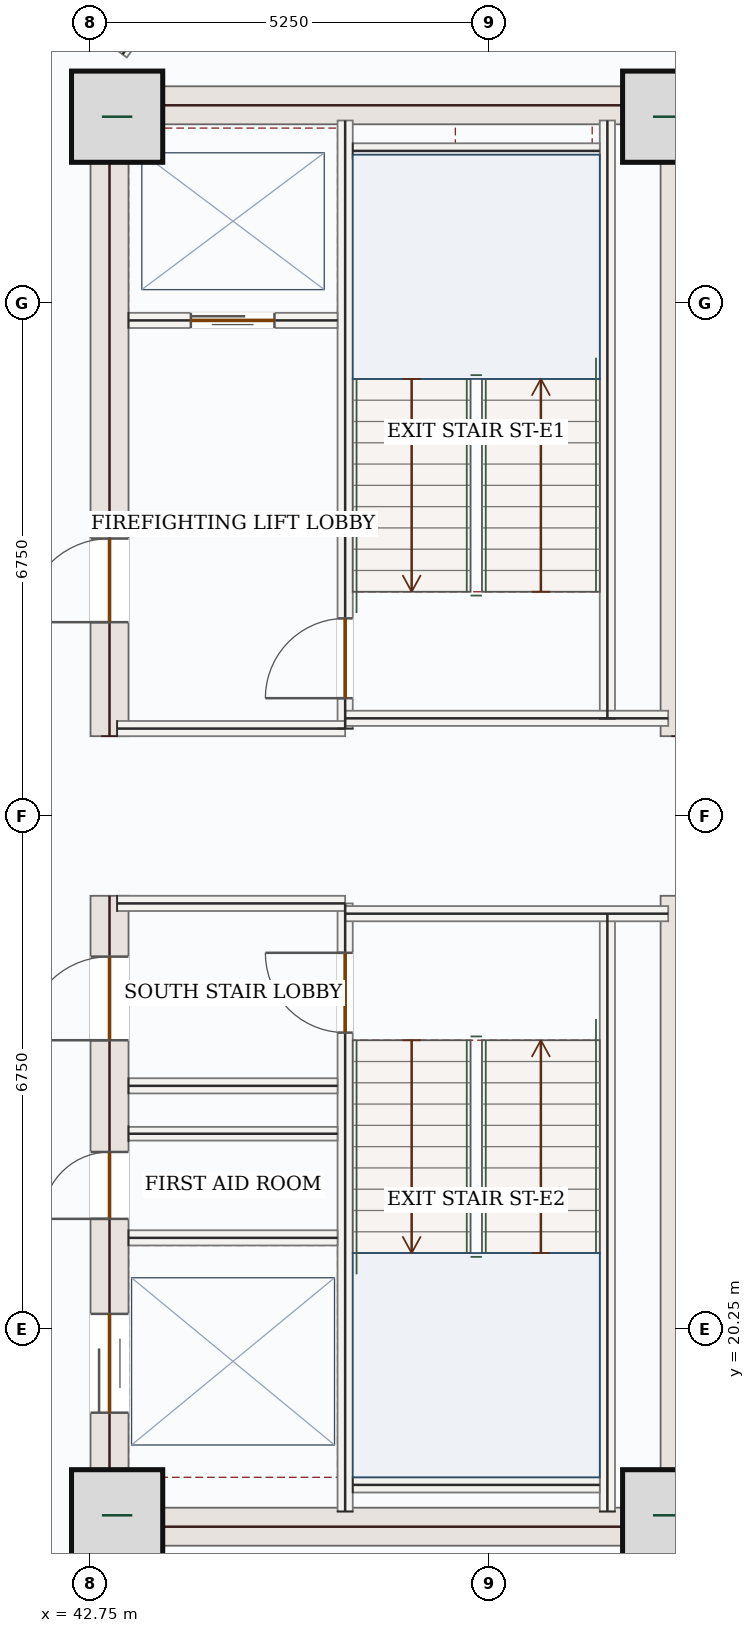
"""IFC4 building model, lengths in metres.
Left out: names, types, materials, properties, quantities, classifications, styles, units other than length and angle.
Written with IfcOpenShell. Run it as: python <this file> out.ifc"""

import sys

from ifc_helpers import new_model, si_unit, direction, frame, frame_2d, origin, origin_2d, place, context, subcontext, project, spatial, rectangle, extrude, source, transform, mapped, element, fill, save


model = new_model("IFC4")
c1 = context("Model", 3, precision=1e-05, world=origin(), true_north=direction((0.0, 1.0)))
c2 = subcontext(c1, "Body", "Model", "MODEL_VIEW")
j1 = project(units=[si_unit("LENGTHUNIT", "METRE"), si_unit("PLANEANGLEUNIT", "RADIAN")], contexts=[c1])
p1 = place(None, origin())
s1 = spatial("IfcSite", under=j1, at=p1, CompositionType="ELEMENT")
p2 = place(p1, origin())
s2 = spatial("IfcBuilding", under=s1, at=p2, CompositionType="ELEMENT")
p3 = place(p2, frame((0.0, 0.0, 135.6)))
s3 = spatial("IfcBuildingStorey", under=s2, at=p3, CompositionType="ELEMENT", Elevation=135.6)
p4 = place(p3, frame((43.0, 17.4, 0.0), z_axis=(0.0, 0.0, 1.0), x_axis=(0.0, 1.0, 0.0)))
e1 = element("IfcWall", 1, at=p4, inside=s3, PredefinedType="SHEAR", context=c2, shape_type="SweptSolid", body=[
    extrude(rectangle(XDim=8.55, YDim=0.5, at=frame_2d((4.275, 0.0))), origin(), (0.0, 0.0, 1.0), 3.62),
])
p5 = place(p4, frame((6.65, 0.0, 0.0)))
e2 = element("IfcOpeningElement", 2, at=p5, cuts=e1, PredefinedType="OPENING", context=c2, shape_type="SweptSolid", body=[
    extrude(rectangle(XDim=1.1, YDim=2.2, at=frame_2d((0.55, 1.1))), frame((0.0, 0.26, 0.0), z_axis=(0.0, -1.0, 0.0), x_axis=(1.0, 0.0, 0.0)), (0.0, 0.0, 1.0), 0.52),
])
p6 = place(p4, frame((1.75, 0.0, 0.0)))
e3 = element("IfcOpeningElement", 3, at=p6, cuts=e1, PredefinedType="OPENING", context=c2, shape_type="SweptSolid", body=[
    extrude(rectangle(XDim=1.3, YDim=2.2, at=frame_2d((0.65, 1.1))), frame((0.0, 0.26, 0.0), z_axis=(0.0, -1.0, 0.0), x_axis=(1.0, 0.0, 0.0)), (0.0, 0.0, 1.0), 0.52),
])
p7 = place(p4, frame((4.3, 0.0, 0.0)))
e4 = element("IfcOpeningElement", 4, at=p7, cuts=e1, PredefinedType="OPENING", context=c2, shape_type="SweptSolid", body=[
    extrude(rectangle(XDim=0.88, YDim=2.1, at=frame_2d((0.44, 1.05))), frame((0.0, 0.26, 0.0), z_axis=(0.0, -1.0, 0.0), x_axis=(1.0, 0.0, 0.0)), (0.0, 0.0, 1.0), 0.52),
])
p8 = place(p3, frame((43.0, 28.05, 0.0), z_axis=(0.0, 0.0, 1.0), x_axis=(0.0, 1.0, 0.0)))
e5 = element("IfcWall", 5, at=p8, inside=s3, PredefinedType="SHEAR", context=c2, shape_type="SweptSolid", body=[
    extrude(rectangle(XDim=8.55, YDim=0.5, at=frame_2d((4.275, 0.0))), origin(), (0.0, 0.0, 1.0), 3.62),
])
p9 = place(p8, frame((1.5, 0.0, 0.0)))
e6 = element("IfcOpeningElement", 6, at=p9, cuts=e5, PredefinedType="OPENING", context=c2, shape_type="SweptSolid", body=[
    extrude(rectangle(XDim=1.1, YDim=2.2, at=frame_2d((0.55, 1.1))), frame((0.0, 0.26, 0.0), z_axis=(0.0, -1.0, 0.0), x_axis=(1.0, 0.0, 0.0)), (0.0, 0.0, 1.0), 0.52),
])
m1 = source(origin(), c2, "Body", "SweptSolid", [
    extrude(rectangle(XDim=8.55, YDim=0.5, at=frame_2d((4.275, 0.0))), origin(), (0.0, 0.0, 1.0), 3.62),
])
for number, where, z_axis, x_axis in (
    (7, (50.5, 17.4, 0.0), (0.0, 0.0, 1.0), (0.0, 1.0, 0.0)),
    (8, (50.5, 28.05, 0.0), (0.0, 0.0, 1.0), (0.0, 1.0, 0.0)),
):
    element("IfcWall", number, at=place(p3, frame(where, z_axis=z_axis, x_axis=x_axis)), inside=s3, PredefinedType="SHEAR", context=c2, shape_type="MappedRepresentation", body=[
        mapped(m1, transform((0.0, 0.0, 0.0), x_axis=(1.0, 0.0, 0.0), y_axis=(0.0, 1.0, 0.0), z_axis=(0.0, 0.0, 1.0), scale=1.0)),
    ])
m2 = source(origin(), c2, "Body", "SweptSolid", [
    extrude(rectangle(XDim=7.0, YDim=0.5, at=frame_2d((3.5, 0.0))), origin(), (0.0, 0.0, 1.0), 3.62),
])
for number, where, z_axis, x_axis in (
    (9, (43.25, 17.65, 0.0), (0.0, 0.0, 1.0), (1.0, 0.0, 0.0)),
    (10, (43.25, 36.35, 0.0), (0.0, 0.0, 1.0), (1.0, 0.0, 0.0)),
):
    element("IfcWall", number, at=place(p3, frame(where, z_axis=z_axis, x_axis=x_axis)), inside=s3, PredefinedType="SHEAR", context=c2, shape_type="MappedRepresentation", body=[
        mapped(m2, transform((0.0, 0.0, 0.0), x_axis=(1.0, 0.0, 0.0), y_axis=(0.0, 1.0, 0.0), z_axis=(0.0, 0.0, 1.0), scale=1.0)),
    ])
m3 = source(origin(), c2, "Body", "SweptSolid", [
    extrude(rectangle(XDim=1.2, YDim=1.2, at=origin_2d()), origin(), (0.0, 0.0, 1.0), 3.9),
])
for number, where, z_axis, x_axis in (
    (11, (43.1, 17.8, 0.0), (0.0, 0.0, 1.0), (1.0, 0.0, 0.0)),
    (12, (50.35, 17.8, 0.0), (0.0, 0.0, 1.0), (1.0, 0.0, 0.0)),
    (13, (43.1, 36.2, 0.0), (0.0, 0.0, 1.0), (1.0, 0.0, 0.0)),
    (14, (50.35, 36.2, 0.0), (0.0, 0.0, 1.0), (1.0, 0.0, 0.0)),
):
    element("IfcColumn", number, at=place(p3, frame(where, z_axis=z_axis, x_axis=x_axis)), inside=s3, PredefinedType="COLUMN", context=c2, shape_type="MappedRepresentation", body=[
        mapped(m3, transform((0.0, 0.0, 0.0), x_axis=(1.0, 0.0, 0.0), y_axis=(0.0, 1.0, 0.0), z_axis=(0.0, 0.0, 1.0), scale=1.0)),
    ])
m4 = source(origin(), c2, "Body", "SweptSolid", [
    extrude(rectangle(XDim=5.258, YDim=0.28, at=frame_2d((2.629, 0.0))), origin(), (0.0, 0.0, 1.0), 3.62),
])
p10 = place(p3, frame((53.06, 18.458, 0.0), z_axis=(0.0, 0.0, 1.0), x_axis=(-0.707106781187, -0.707106781187, 0.0)))
e15 = element("IfcWall", 15, at=p10, inside=s3, PredefinedType="SOLIDWALL", context=c2, shape_type="MappedRepresentation", body=[
    mapped(m4, transform((0.0, 0.0, 0.0), x_axis=(1.0, 0.0, 0.0), y_axis=(0.0, 1.0, 0.0), z_axis=(0.0, 0.0, 1.0), scale=1.0)),
])
m5 = source(origin(), c2, "Body", "SweptSolid", [
    extrude(rectangle(XDim=3.967, YDim=0.28, at=frame_2d((1.984, 0.0))), origin(), (0.0, 0.0, 1.0), 3.62),
])
p11 = place(p3, frame((49.342, 39.26, 0.0), z_axis=(0.0, 0.0, 1.0), x_axis=(0.707076011326, -0.707137549708, 0.0)))
e16 = element("IfcWall", 16, at=p11, inside=s3, PredefinedType="SOLIDWALL", context=c2, shape_type="MappedRepresentation", body=[
    mapped(m5, transform((0.0, 0.0, 0.0), x_axis=(1.0, 0.0, 0.0), y_axis=(0.0, 1.0, 0.0), z_axis=(0.0, 0.0, 1.0), scale=1.0)),
])
m6 = source(origin(), c2, "Body", "SweptSolid", [
    extrude(rectangle(XDim=7.87, YDim=0.2, at=frame_2d((3.935, 0.0))), origin(), (0.0, 0.0, 1.0), 3.62),
])
for number, where, z_axis, x_axis in (
    (17, (49.55, 17.85, 0.0), (0.0, 0.0, 1.0), (0.0, 1.0, 0.0)),
    (18, (49.55, 28.28, 0.0), (0.0, 0.0, 1.0), (0.0, 1.0, 0.0)),
):
    element("IfcWall", number, at=place(p3, frame(where, z_axis=z_axis, x_axis=x_axis)), inside=s3, PredefinedType="SOLIDWALL", context=c2, shape_type="MappedRepresentation", body=[
        mapped(m6, transform((0.0, 0.0, 0.0), x_axis=(1.0, 0.0, 0.0), y_axis=(0.0, 1.0, 0.0), z_axis=(0.0, 0.0, 1.0), scale=1.0)),
    ])
p12 = place(p3, frame((46.1, 17.85, 0.0), z_axis=(0.0, 0.0, 1.0), x_axis=(0.0, 1.0, 0.0)))
e19 = element("IfcWall", 19, at=p12, inside=s3, PredefinedType="SOLIDWALL", context=c2, shape_type="SweptSolid", body=[
    extrude(rectangle(XDim=8.0, YDim=0.2, at=frame_2d((4.0, 0.0))), origin(), (0.0, 0.0, 1.0), 3.62),
])
p13 = place(p12, frame((6.3, 0.0, 0.0)))
e20 = element("IfcOpeningElement", 20, at=p13, cuts=e19, PredefinedType="OPENING", context=c2, shape_type="SweptSolid", body=[
    extrude(rectangle(XDim=1.05, YDim=2.15, at=frame_2d((0.525, 1.075))), frame((0.0, 0.11, 0.0), z_axis=(0.0, -1.0, 0.0), x_axis=(1.0, 0.0, 0.0)), (0.0, 0.0, 1.0), 0.22),
])
p14 = place(p3, frame((46.1, 28.15, 0.0), z_axis=(0.0, 0.0, 1.0), x_axis=(0.0, 1.0, 0.0)))
e21 = element("IfcWall", 21, at=p14, inside=s3, PredefinedType="SOLIDWALL", context=c2, shape_type="SweptSolid", body=[
    extrude(rectangle(XDim=8.0, YDim=0.2, at=frame_2d((4.0, 0.0))), origin(), (0.0, 0.0, 1.0), 3.62),
])
p15 = place(p14, frame((0.4, 0.0, 0.0)))
e22 = element("IfcOpeningElement", 22, at=p15, cuts=e21, PredefinedType="OPENING", context=c2, shape_type="SweptSolid", body=[
    extrude(rectangle(XDim=1.05, YDim=2.15, at=frame_2d((0.525, 1.075))), frame((0.0, 0.11, 0.0), z_axis=(0.0, -1.0, 0.0), x_axis=(1.0, 0.0, 0.0)), (0.0, 0.0, 1.0), 0.22),
])
m7 = source(origin(), c2, "Body", "SweptSolid", [
    extrude(rectangle(XDim=3.0, YDim=0.2, at=frame_2d((1.5, 0.0))), origin(), (0.0, 0.0, 1.0), 3.62),
])
p16 = place(p3, frame((43.1, 25.85, 0.0), z_axis=(0.0, 0.0, 1.0), x_axis=(1.0, 0.0, 0.0)))
e23 = element("IfcWall", 23, at=p16, inside=s3, PredefinedType="SOLIDWALL", context=c2, shape_type="MappedRepresentation", body=[
    mapped(m7, transform((0.0, 0.0, 0.0), x_axis=(1.0, 0.0, 0.0), y_axis=(0.0, 1.0, 0.0), z_axis=(0.0, 0.0, 1.0), scale=1.0)),
])
m8 = source(origin(), c2, "Body", "SweptSolid", [
    extrude(rectangle(XDim=4.25, YDim=0.2, at=frame_2d((2.125, 0.0))), origin(), (0.0, 0.0, 1.0), 3.62),
])
p17 = place(p3, frame((46.1, 25.715, 0.0), z_axis=(0.0, 0.0, 1.0), x_axis=(1.0, 0.0, 0.0)))
e24 = element("IfcWall", 24, at=p17, inside=s3, PredefinedType="SOLIDWALL", context=c2, shape_type="MappedRepresentation", body=[
    mapped(m8, transform((0.0, 0.0, 0.0), x_axis=(1.0, 0.0, 0.0), y_axis=(0.0, 1.0, 0.0), z_axis=(0.0, 0.0, 1.0), scale=1.0)),
])
p18 = place(p3, frame((43.1, 28.15, 0.0), z_axis=(0.0, 0.0, 1.0), x_axis=(1.0, 0.0, 0.0)))
e25 = element("IfcWall", 25, at=p18, inside=s3, PredefinedType="SOLIDWALL", context=c2, shape_type="MappedRepresentation", body=[
    mapped(m7, transform((0.0, 0.0, 0.0), x_axis=(1.0, 0.0, 0.0), y_axis=(0.0, 1.0, 0.0), z_axis=(0.0, 0.0, 1.0), scale=1.0)),
])
p19 = place(p3, frame((46.1, 28.285, 0.0), z_axis=(0.0, 0.0, 1.0), x_axis=(1.0, 0.0, 0.0)))
e26 = element("IfcWall", 26, at=p19, inside=s3, PredefinedType="SOLIDWALL", context=c2, shape_type="MappedRepresentation", body=[
    mapped(m8, transform((0.0, 0.0, 0.0), x_axis=(1.0, 0.0, 0.0), y_axis=(0.0, 1.0, 0.0), z_axis=(0.0, 0.0, 1.0), scale=1.0)),
])
m9 = source(origin(), c2, "Body", "SweptSolid", [
    extrude(rectangle(XDim=3.25, YDim=0.2, at=frame_2d((1.625, 0.0))), origin(), (0.0, 0.0, 1.0), 3.62),
])
for number, where, z_axis, x_axis in (
    (27, (46.2, 35.75, 0.0), (0.0, 0.0, 1.0), (1.0, 0.0, 0.0)),
    (28, (46.2, 18.2, 0.0), (0.0, 0.0, 1.0), (1.0, 0.0, 0.0)),
):
    element("IfcWall", number, at=place(p3, frame(where, z_axis=z_axis, x_axis=x_axis)), inside=s3, PredefinedType="SOLIDWALL", context=c2, shape_type="MappedRepresentation", body=[
        mapped(m9, transform((0.0, 0.0, 0.0), x_axis=(1.0, 0.0, 0.0), y_axis=(0.0, 1.0, 0.0), z_axis=(0.0, 0.0, 1.0), scale=1.0)),
    ])
p20 = place(p3, frame((43.25, 33.52, 0.0), z_axis=(0.0, 0.0, 1.0), x_axis=(1.0, 0.0, 0.0)))
e29 = element("IfcWall", 29, at=p20, inside=s3, PredefinedType="SOLIDWALL", context=c2, shape_type="SweptSolid", body=[
    extrude(rectangle(XDim=2.75, YDim=0.2, at=frame_2d((1.375, 0.0))), origin(), (0.0, 0.0, 1.0), 3.62),
])
p21 = place(p20, frame((0.82, 0.0, 0.0)))
e30 = element("IfcOpeningElement", 30, at=p21, cuts=e29, PredefinedType="OPENING", context=c2, shape_type="SweptSolid", body=[
    extrude(rectangle(XDim=1.1, YDim=2.15, at=frame_2d((0.55, 1.075))), frame((0.0, 0.11, 0.0), z_axis=(0.0, -1.0, 0.0), x_axis=(1.0, 0.0, 0.0)), (0.0, 0.0, 1.0), 0.22),
])
m10 = source(origin(), c2, "Body", "SweptSolid", [
    extrude(rectangle(XDim=2.75, YDim=0.2, at=frame_2d((1.375, 0.0))), origin(), (0.0, 0.0, 1.0), 3.62),
])
for number, where, z_axis, x_axis in (
    (31, (43.25, 23.45, 0.0), (0.0, 0.0, 1.0), (1.0, 0.0, 0.0)),
    (32, (43.25, 21.45, 0.0), (0.0, 0.0, 1.0), (1.0, 0.0, 0.0)),
):
    element("IfcWall", number, at=place(p3, frame(where, z_axis=z_axis, x_axis=x_axis)), inside=s3, PredefinedType="SOLIDWALL", context=c2, shape_type="MappedRepresentation", body=[
        mapped(m10, transform((0.0, 0.0, 0.0), x_axis=(1.0, 0.0, 0.0), y_axis=(0.0, 1.0, 0.0), z_axis=(0.0, 0.0, 1.0), scale=1.0)),
    ])
m11 = source(origin(), c2, "Body", "SweptSolid", [
    extrude(rectangle(XDim=2.75, YDim=0.18, at=frame_2d((1.375, 0.0))), origin(), (0.0, 0.0, 1.0), 3.62),
])
p22 = place(p3, frame((43.25, 22.82, 0.0), z_axis=(0.0, 0.0, 1.0), x_axis=(1.0, 0.0, 0.0)))
e33 = element("IfcWall", 33, at=p22, inside=s3, PredefinedType="PARTITIONING", context=c2, shape_type="MappedRepresentation", body=[
    mapped(m11, transform((0.0, 0.0, 0.0), x_axis=(1.0, 0.0, 0.0), y_axis=(0.0, 1.0, 0.0), z_axis=(0.0, 0.0, 1.0), scale=1.0)),
])
m12 = source(origin(), c2, "Body", "SweptSolid", [
    extrude(rectangle(XDim=2.582, YDim=0.14, at=frame_2d((1.291, 0.0))), origin(), (0.0, 0.0, 1.0), 3.62),
])
p23 = place(p3, frame((44.68, 39.115, 0.0), z_axis=(0.0, 0.0, 1.0), x_axis=(-0.584533864389, -0.811369312572, 0.0)))
e34 = element("IfcWall", 34, at=p23, inside=s3, PredefinedType="PARTITIONING", context=c2, shape_type="MappedRepresentation", body=[
    mapped(m12, transform((0.0, 0.0, 0.0), x_axis=(1.0, 0.0, 0.0), y_axis=(0.0, 1.0, 0.0), z_axis=(0.0, 0.0, 1.0), scale=1.0)),
])
m13 = source(origin(), c2, "Body", "SweptSolid", [
    extrude(rectangle(XDim=1.05, YDim=2.15, at=frame_2d((0.525, 1.075))), frame((0.0, 0.025, 0.0), z_axis=(0.0, -1.0, 0.0), x_axis=(1.0, 0.0, 0.0)), (0.0, 0.0, 1.0), 0.05),
])
p24 = place(p15, origin())
e35 = element("IfcDoor", 35, at=p24, inside=s3, OperationType="SINGLE_SWING_LEFT", PredefinedType="DOOR", context=c2, shape_type="MappedRepresentation", body=[
    mapped(m13, transform((0.0, 0.0, 0.0), x_axis=(1.0, 0.0, 0.0), y_axis=(0.0, 1.0, 0.0), z_axis=(0.0, 0.0, 1.0), scale=1.0)),
])
fill(e22, e35)
p25 = place(p13, origin())
e36 = element("IfcDoor", 36, at=p25, inside=s3, OperationType="SINGLE_SWING_RIGHT", PredefinedType="DOOR", context=c2, shape_type="MappedRepresentation", body=[
    mapped(m13, transform((0.0, 0.0, 0.0), x_axis=(1.0, 0.0, 0.0), y_axis=(0.0, 1.0, 0.0), z_axis=(0.0, 0.0, 1.0), scale=1.0)),
])
fill(e20, e36)
m14 = source(origin(), c2, "Body", "SweptSolid", [
    extrude(rectangle(XDim=1.1, YDim=2.15, at=frame_2d((0.55, 1.075))), frame((0.0, 0.025, 0.0), z_axis=(0.0, -1.0, 0.0), x_axis=(1.0, 0.0, 0.0)), (0.0, 0.0, 1.0), 0.05),
])
p26 = place(p21, origin())
e37 = element("IfcDoor", 37, at=p26, inside=s3, OperationType="DOUBLE_DOOR_SLIDING", PredefinedType="DOOR", context=c2, shape_type="MappedRepresentation", body=[
    mapped(m14, transform((0.0, 0.0, 0.0), x_axis=(1.0, 0.0, 0.0), y_axis=(0.0, 1.0, 0.0), z_axis=(0.0, 0.0, 1.0), scale=1.0)),
])
fill(e30, e37)
m15 = source(origin(), c2, "Body", "SweptSolid", [
    extrude(rectangle(XDim=1.1, YDim=2.2, at=frame_2d((0.55, 1.1))), frame((0.0, 0.025, 0.0), z_axis=(0.0, -1.0, 0.0), x_axis=(1.0, 0.0, 0.0)), (0.0, 0.0, 1.0), 0.05),
])
p27 = place(p9, origin())
e38 = element("IfcDoor", 38, at=p27, inside=s3, OperationType="SINGLE_SWING_LEFT", PredefinedType="DOOR", context=c2, shape_type="MappedRepresentation", body=[
    mapped(m15, transform((0.0, 0.0, 0.0), x_axis=(1.0, 0.0, 0.0), y_axis=(0.0, 1.0, 0.0), z_axis=(0.0, 0.0, 1.0), scale=1.0)),
])
fill(e6, e38)
p28 = place(p5, origin())
e39 = element("IfcDoor", 39, at=p28, inside=s3, OperationType="SINGLE_SWING_LEFT", PredefinedType="DOOR", context=c2, shape_type="MappedRepresentation", body=[
    mapped(m15, transform((0.0, 0.0, 0.0), x_axis=(1.0, 0.0, 0.0), y_axis=(0.0, 1.0, 0.0), z_axis=(0.0, 0.0, 1.0), scale=1.0)),
])
fill(e2, e39)
m16 = source(origin(), c2, "Body", "SweptSolid", [
    extrude(rectangle(XDim=1.3, YDim=2.2, at=frame_2d((0.65, 1.1))), frame((0.0, 0.025, 0.0), z_axis=(0.0, -1.0, 0.0), x_axis=(1.0, 0.0, 0.0)), (0.0, 0.0, 1.0), 0.05),
])
p29 = place(p6, origin())
e40 = element("IfcDoor", 40, at=p29, inside=s3, OperationType="DOUBLE_DOOR_SLIDING", PredefinedType="DOOR", context=c2, shape_type="MappedRepresentation", body=[
    mapped(m16, transform((0.0, 0.0, 0.0), x_axis=(1.0, 0.0, 0.0), y_axis=(0.0, 1.0, 0.0), z_axis=(0.0, 0.0, 1.0), scale=1.0)),
])
fill(e3, e40)
m17 = source(origin(), c2, "Body", "SweptSolid", [
    extrude(rectangle(XDim=0.88, YDim=2.1, at=frame_2d((0.44, 1.05))), frame((0.0, 0.025, 0.0), z_axis=(0.0, -1.0, 0.0), x_axis=(1.0, 0.0, 0.0)), (0.0, 0.0, 1.0), 0.05),
])
p30 = place(p7, origin())
e41 = element("IfcDoor", 41, at=p30, inside=s3, OperationType="SINGLE_SWING_LEFT", PredefinedType="DOOR", context=c2, shape_type="MappedRepresentation", body=[
    mapped(m17, transform((0.0, 0.0, 0.0), x_axis=(1.0, 0.0, 0.0), y_axis=(0.0, 1.0, 0.0), z_axis=(0.0, 0.0, 1.0), scale=1.0)),
])
fill(e4, e41)
save(model, sys.argv[1])
